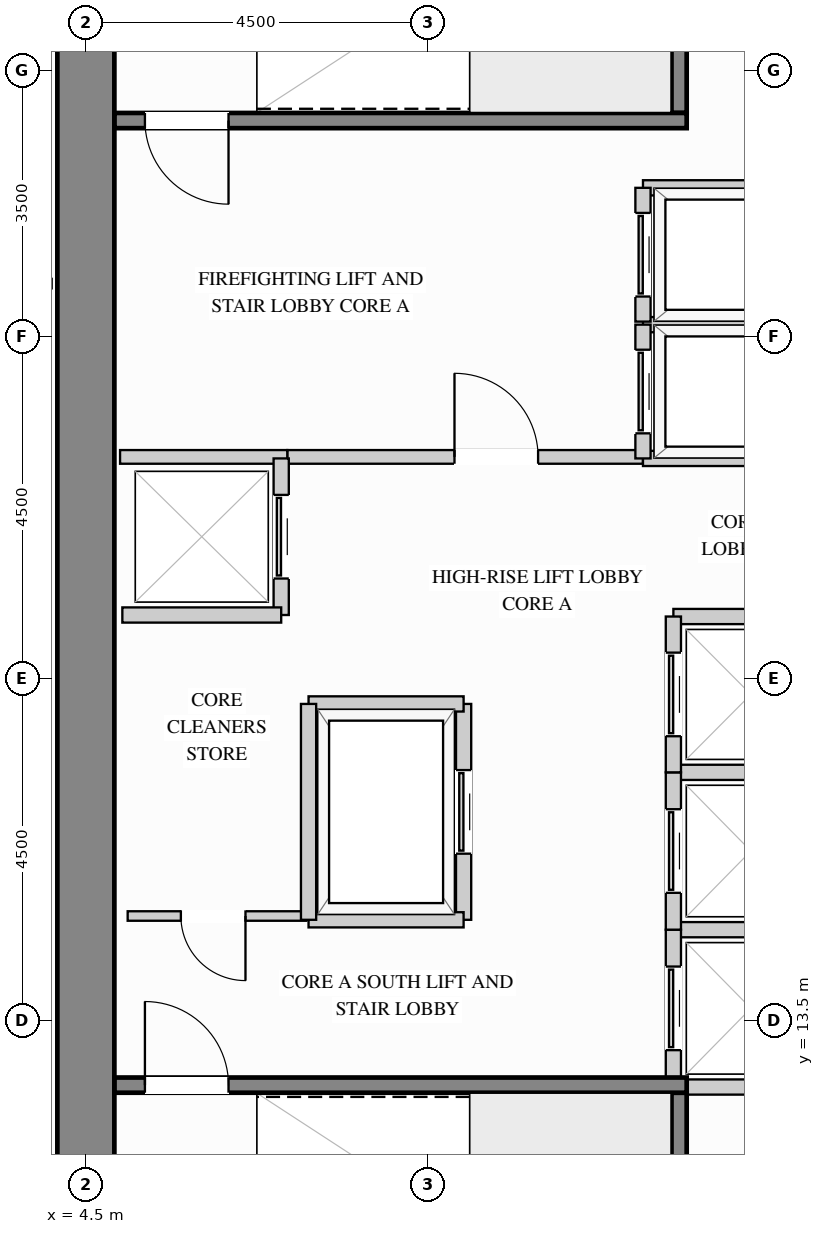
"""IFC4 building model, lengths in metres.
Left out: names, types, materials, properties, quantities, classifications, styles, units other than length and angle.
Written with IfcOpenShell. Run it as: python <this file> out.ifc"""

import sys

from ifc_helpers import new_model, si_unit, direction, frame, frame_2d, origin, place, context, subcontext, project, spatial, rectangle, extrude, source, transform, mapped, element, fill, save


model = new_model("IFC4")
c1 = context("Model", 3, precision=1e-05, world=origin(), true_north=direction((0.0, 1.0)))
c2 = subcontext(c1, "Body", "Model", "MODEL_VIEW")
j1 = project(units=[si_unit("LENGTHUNIT", "METRE"), si_unit("PLANEANGLEUNIT", "RADIAN")], contexts=[c1])
p1 = place(None, origin())
s1 = spatial("IfcSite", under=j1, at=p1, CompositionType="ELEMENT")
p2 = place(p1, origin())
s2 = spatial("IfcBuilding", under=s1, at=p2, CompositionType="ELEMENT")
p3 = place(p2, frame((0.0, 0.0, 135.0)))
s3 = spatial("IfcBuildingStorey", under=s2, at=p3, CompositionType="ELEMENT", Elevation=135.0)
m1 = source(origin(), c2, "Body", "SweptSolid", [
    extrude(rectangle(XDim=20.25, YDim=0.75, at=frame_2d((10.125, 0.0))), origin(), (0.0, 0.0, 1.0), 3.32),
])
p4 = place(p3, frame((4.5, 8.875, 0.0), z_axis=(0.0, 0.0, 1.0), x_axis=(0.0, 1.0, 0.0)))
e1 = element("IfcWall", 1, at=p4, inside=s3, PredefinedType="SHEAR", context=c2, shape_type="MappedRepresentation", body=[
    mapped(m1, transform((0.0, 0.0, 0.0), x_axis=(1.0, 0.0, 0.0), y_axis=(0.0, 1.0, 0.0), z_axis=(0.0, 0.0, 1.0))),
])
p5 = place(p3, frame((7.15, 20.92, 0.0), z_axis=(0.0, 0.0, 1.0), x_axis=(1.0, 0.0, 0.0)))
e2 = element("IfcWall", 2, at=p5, inside=s3, PredefinedType="PARTITIONING", context=c2, shape_type="SweptSolid", body=[
    extrude(rectangle(XDim=4.68, YDim=0.18, at=frame_2d((2.34, 0.0))), origin(), (0.0, 0.0, 1.0), 3.305),
])
p6 = place(p5, frame((2.2, 0.0, 0.0)))
e3 = element("IfcOpeningElement", 3, at=p6, cuts=e2, PredefinedType="OPENING", context=c2, shape_type="SweptSolid", body=[
    extrude(rectangle(XDim=1.1, YDim=2.15, at=frame_2d((0.55, 1.075))), frame((0.0, 0.1, 0.0), z_axis=(0.0, -1.0, 0.0), x_axis=(1.0, 0.0, 0.0)), (0.0, 0.0, 1.0), 0.2),
])
m2 = source(origin(), c2, "Body", "SweptSolid", [
    extrude(rectangle(XDim=2.2, YDim=0.18, at=frame_2d((1.1, 0.0))), origin(), (0.0, 0.0, 1.0), 3.305),
])
p7 = place(p3, frame((4.95, 20.92, 0.0), z_axis=(0.0, 0.0, 1.0), x_axis=(1.0, 0.0, 0.0)))
e4 = element("IfcWall", 4, at=p7, inside=s3, PredefinedType="PARTITIONING", context=c2, shape_type="MappedRepresentation", body=[
    mapped(m2, transform((0.0, 0.0, 0.0), x_axis=(1.0, 0.0, 0.0), y_axis=(0.0, 1.0, 0.0), z_axis=(0.0, 0.0, 1.0))),
])
p8 = place(p3, frame((5.05, 14.88, 0.0), z_axis=(0.0, 0.0, 1.0), x_axis=(1.0, 0.0, 0.0)))
e5 = element("IfcWall", 5, at=p8, inside=s3, PredefinedType="PARTITIONING", context=c2, shape_type="SweptSolid", body=[
    extrude(rectangle(XDim=2.35, YDim=0.125, at=frame_2d((1.175, 0.0))), origin(), (0.0, 0.0, 1.0), 3.305),
])
p9 = place(p8, frame((0.7, 0.0, 0.0)))
e6 = element("IfcOpeningElement", 6, at=p9, cuts=e5, PredefinedType="OPENING", context=c2, shape_type="SweptSolid", body=[
    extrude(rectangle(XDim=0.85, YDim=2.1, at=frame_2d((0.425, 1.05))), frame((0.0, 0.073, 0.0), z_axis=(0.0, -1.0, 0.0), x_axis=(1.0, 0.0, 0.0)), (0.0, 0.0, 1.0), 0.145),
])
m3 = source(origin(), c2, "Body", "SweptSolid", [
    extrude(rectangle(XDim=3.698, YDim=0.125, at=frame_2d((1.849, 0.0))), origin(), (0.0, 0.0, 1.0), 3.305),
])
p10 = place(p3, frame((0.352, 23.2, 0.0), z_axis=(0.0, 0.0, 1.0), x_axis=(1.0, 0.0, 0.0)))
e7 = element("IfcWall", 7, at=p10, inside=s3, PredefinedType="PARTITIONING", context=c2, shape_type="MappedRepresentation", body=[
    mapped(m3, transform((0.0, 0.0, 0.0), x_axis=(1.0, 0.0, 0.0), y_axis=(0.0, 1.0, 0.0), z_axis=(0.0, 0.0, 1.0))),
])
m4 = source(origin(), c2, "Body", "SweptSolid", [
    extrude(rectangle(XDim=2.265, YDim=0.2, at=frame_2d((1.132, 0.0))), origin(), (0.0, 0.0, 1.0), 3.305),
])
for number, where, z_axis, x_axis in (
    (8, (11.83, 22.66, 0.0), (0.0, 0.0, 1.0), (1.0, 0.0, 0.0)),
    (9, (11.83, 20.9, 0.0), (0.0, 0.0, 1.0), (1.0, 0.0, 0.0)),
):
    element("IfcWall", number, at=place(p3, frame(where, z_axis=z_axis, x_axis=x_axis)), inside=s3, PredefinedType="PARTITIONING", context=c2, shape_type="MappedRepresentation", body=[
        mapped(m4, transform((0.0, 0.0, 0.0), x_axis=(1.0, 0.0, 0.0), y_axis=(0.0, 1.0, 0.0), z_axis=(0.0, 0.0, 1.0))),
    ])
p11 = place(p3, frame((11.83, 20.9, 0.0), z_axis=(0.0, 0.0, 1.0), x_axis=(0.0, 1.0, 0.0)))
e10 = element("IfcWall", 10, at=p11, inside=s3, PredefinedType="PARTITIONING", context=c2, shape_type="SweptSolid", body=[
    extrude(rectangle(XDim=1.76, YDim=0.2, at=frame_2d((0.88, 0.0))), origin(), (0.0, 0.0, 1.0), 3.305),
])
p12 = place(p11, frame((0.33, 0.0, 0.0)))
e11 = element("IfcOpeningElement", 11, at=p12, cuts=e10, PredefinedType="OPENING", context=c2, shape_type="SweptSolid", body=[
    extrude(rectangle(XDim=1.1, YDim=2.2, at=frame_2d((0.55, 1.1))), frame((0.0, 0.11, 0.0), z_axis=(0.0, -1.0, 0.0), x_axis=(1.0, 0.0, 0.0)), (0.0, 0.0, 1.0), 0.22),
])
p13 = place(p3, frame((11.83, 24.46, 0.0), z_axis=(0.0, 0.0, 1.0), x_axis=(1.0, 0.0, 0.0)))
e12 = element("IfcWall", 12, at=p13, inside=s3, PredefinedType="PARTITIONING", context=c2, shape_type="MappedRepresentation", body=[
    mapped(m4, transform((0.0, 0.0, 0.0), x_axis=(1.0, 0.0, 0.0), y_axis=(0.0, 1.0, 0.0), z_axis=(0.0, 0.0, 1.0))),
])
p14 = place(p3, frame((11.83, 22.7, 0.0), z_axis=(0.0, 0.0, 1.0), x_axis=(0.0, 1.0, 0.0)))
e13 = element("IfcWall", 13, at=p14, inside=s3, PredefinedType="PARTITIONING", context=c2, shape_type="SweptSolid", body=[
    extrude(rectangle(XDim=1.76, YDim=0.2, at=frame_2d((0.88, 0.0))), origin(), (0.0, 0.0, 1.0), 3.305),
])
p15 = place(p14, frame((0.33, 0.0, 0.0)))
e14 = element("IfcOpeningElement", 14, at=p15, cuts=e13, PredefinedType="OPENING", context=c2, shape_type="SweptSolid", body=[
    extrude(rectangle(XDim=1.1, YDim=2.2, at=frame_2d((0.55, 1.1))), frame((0.0, 0.11, 0.0), z_axis=(0.0, -1.0, 0.0), x_axis=(1.0, 0.0, 0.0)), (0.0, 0.0, 1.0), 0.22),
])
m5 = source(origin(), c2, "Body", "SweptSolid", [
    extrude(rectangle(XDim=1.865, YDim=0.2, at=frame_2d((0.933, 0.0))), origin(), (0.0, 0.0, 1.0), 3.305),
])
for number, where, z_axis, x_axis in (
    (15, (12.23, 14.7, 0.0), (0.0, 0.0, 1.0), (1.0, 0.0, 0.0)),
    (16, (12.23, 12.63, 0.0), (0.0, 0.0, 1.0), (1.0, 0.0, 0.0)),
):
    element("IfcWall", number, at=place(p3, frame(where, z_axis=z_axis, x_axis=x_axis)), inside=s3, PredefinedType="PARTITIONING", context=c2, shape_type="MappedRepresentation", body=[
        mapped(m5, transform((0.0, 0.0, 0.0), x_axis=(1.0, 0.0, 0.0), y_axis=(0.0, 1.0, 0.0), z_axis=(0.0, 0.0, 1.0))),
    ])
p16 = place(p3, frame((12.23, 12.63, 0.0), z_axis=(0.0, 0.0, 1.0), x_axis=(0.0, 1.0, 0.0)))
e17 = element("IfcWall", 17, at=p16, inside=s3, PredefinedType="PARTITIONING", context=c2, shape_type="SweptSolid", body=[
    extrude(rectangle(XDim=2.07, YDim=0.2, at=frame_2d((1.035, 0.0))), origin(), (0.0, 0.0, 1.0), 3.305),
])
p17 = place(p16, frame((0.485, 0.0, 0.0)))
e18 = element("IfcOpeningElement", 18, at=p17, cuts=e17, PredefinedType="OPENING", context=c2, shape_type="SweptSolid", body=[
    extrude(rectangle(XDim=1.1, YDim=2.2, at=frame_2d((0.55, 1.1))), frame((0.0, 0.11, 0.0), z_axis=(0.0, -1.0, 0.0), x_axis=(1.0, 0.0, 0.0)), (0.0, 0.0, 1.0), 0.22),
])
p18 = place(p3, frame((12.23, 16.77, 0.0), z_axis=(0.0, 0.0, 1.0), x_axis=(1.0, 0.0, 0.0)))
e19 = element("IfcWall", 19, at=p18, inside=s3, PredefinedType="PARTITIONING", context=c2, shape_type="MappedRepresentation", body=[
    mapped(m5, transform((0.0, 0.0, 0.0), x_axis=(1.0, 0.0, 0.0), y_axis=(0.0, 1.0, 0.0), z_axis=(0.0, 0.0, 1.0))),
])
p19 = place(p3, frame((12.23, 14.7, 0.0), z_axis=(0.0, 0.0, 1.0), x_axis=(0.0, 1.0, 0.0)))
e20 = element("IfcWall", 20, at=p19, inside=s3, PredefinedType="PARTITIONING", context=c2, shape_type="SweptSolid", body=[
    extrude(rectangle(XDim=2.07, YDim=0.2, at=frame_2d((1.035, 0.0))), origin(), (0.0, 0.0, 1.0), 3.305),
])
p20 = place(p19, frame((0.485, 0.0, 0.0)))
e21 = element("IfcOpeningElement", 21, at=p20, cuts=e20, PredefinedType="OPENING", context=c2, shape_type="SweptSolid", body=[
    extrude(rectangle(XDim=1.1, YDim=2.2, at=frame_2d((0.55, 1.1))), frame((0.0, 0.11, 0.0), z_axis=(0.0, -1.0, 0.0), x_axis=(1.0, 0.0, 0.0)), (0.0, 0.0, 1.0), 0.22),
])
p21 = place(p3, frame((12.23, 18.82, 0.0), z_axis=(0.0, 0.0, 1.0), x_axis=(1.0, 0.0, 0.0)))
e22 = element("IfcWall", 22, at=p21, inside=s3, PredefinedType="PARTITIONING", context=c2, shape_type="MappedRepresentation", body=[
    mapped(m5, transform((0.0, 0.0, 0.0), x_axis=(1.0, 0.0, 0.0), y_axis=(0.0, 1.0, 0.0), z_axis=(0.0, 0.0, 1.0))),
])
p22 = place(p3, frame((12.23, 16.77, 0.0), z_axis=(0.0, 0.0, 1.0), x_axis=(0.0, 1.0, 0.0)))
e23 = element("IfcWall", 23, at=p22, inside=s3, PredefinedType="PARTITIONING", context=c2, shape_type="SweptSolid", body=[
    extrude(rectangle(XDim=2.05, YDim=0.2, at=frame_2d((1.025, 0.0))), origin(), (0.0, 0.0, 1.0), 3.305),
])
p23 = place(p22, frame((0.475, 0.0, 0.0)))
e24 = element("IfcOpeningElement", 24, at=p23, cuts=e23, PredefinedType="OPENING", context=c2, shape_type="SweptSolid", body=[
    extrude(rectangle(XDim=1.1, YDim=2.2, at=frame_2d((0.55, 1.1))), frame((0.0, 0.11, 0.0), z_axis=(0.0, -1.0, 0.0), x_axis=(1.0, 0.0, 0.0)), (0.0, 0.0, 1.0), 0.22),
])
p24 = place(p3, frame((7.07, 18.84, 0.0), z_axis=(0.0, 0.0, 1.0), x_axis=(0.0, 1.0, 0.0)))
e25 = element("IfcWall", 25, at=p24, inside=s3, PredefinedType="PARTITIONING", context=c2, shape_type="SweptSolid", body=[
    extrude(rectangle(XDim=2.06, YDim=0.2, at=frame_2d((1.03, 0.0))), origin(), (0.0, 0.0, 1.0), 3.305),
])
p25 = place(p24, frame((0.48, 0.0, 0.0)))
e26 = element("IfcOpeningElement", 26, at=p25, cuts=e25, PredefinedType="OPENING", context=c2, shape_type="SweptSolid", body=[
    extrude(rectangle(XDim=1.1, YDim=2.2, at=frame_2d((0.55, 1.1))), frame((0.0, 0.11, 0.0), z_axis=(0.0, -1.0, 0.0), x_axis=(1.0, 0.0, 0.0)), (0.0, 0.0, 1.0), 0.22),
])
m6 = source(origin(), c2, "Body", "SweptSolid", [
    extrude(rectangle(XDim=2.09, YDim=0.2, at=frame_2d((1.045, 0.0))), origin(), (0.0, 0.0, 1.0), 3.305),
])
p26 = place(p3, frame((4.98, 18.84, 0.0), z_axis=(0.0, 0.0, 1.0), x_axis=(1.0, 0.0, 0.0)))
e27 = element("IfcWall", 27, at=p26, inside=s3, PredefinedType="PARTITIONING", context=c2, shape_type="MappedRepresentation", body=[
    mapped(m6, transform((0.0, 0.0, 0.0), x_axis=(1.0, 0.0, 0.0), y_axis=(0.0, 1.0, 0.0), z_axis=(0.0, 0.0, 1.0))),
])
p27 = place(p3, frame((9.47, 14.83, 0.0), z_axis=(0.0, 0.0, 1.0), x_axis=(0.0, 1.0, 0.0)))
e28 = element("IfcWall", 28, at=p27, inside=s3, PredefinedType="PARTITIONING", context=c2, shape_type="SweptSolid", body=[
    extrude(rectangle(XDim=2.84, YDim=0.2, at=frame_2d((1.42, 0.0))), origin(), (0.0, 0.0, 1.0), 3.305),
])
p28 = place(p27, frame((0.87, 0.0, 0.0)))
e29 = element("IfcOpeningElement", 29, at=p28, cuts=e28, PredefinedType="OPENING", context=c2, shape_type="SweptSolid", body=[
    extrude(rectangle(XDim=1.1, YDim=2.2, at=frame_2d((0.55, 1.1))), frame((0.0, 0.11, 0.0), z_axis=(0.0, -1.0, 0.0), x_axis=(1.0, 0.0, 0.0)), (0.0, 0.0, 1.0), 0.22),
])
m7 = source(origin(), c2, "Body", "SweptSolid", [
    extrude(rectangle(XDim=2.04, YDim=0.2, at=frame_2d((1.02, 0.0))), origin(), (0.0, 0.0, 1.0), 3.305),
])
for number, where, z_axis, x_axis in (
    (30, (7.43, 17.67, 0.0), (0.0, 0.0, 1.0), (1.0, 0.0, 0.0)),
    (31, (7.43, 14.83, 0.0), (0.0, 0.0, 1.0), (1.0, 0.0, 0.0)),
):
    element("IfcWall", number, at=place(p3, frame(where, z_axis=z_axis, x_axis=x_axis)), inside=s3, PredefinedType="PARTITIONING", context=c2, shape_type="MappedRepresentation", body=[
        mapped(m7, transform((0.0, 0.0, 0.0), x_axis=(1.0, 0.0, 0.0), y_axis=(0.0, 1.0, 0.0), z_axis=(0.0, 0.0, 1.0))),
    ])
m8 = source(origin(), c2, "Body", "SweptSolid", [
    extrude(rectangle(XDim=2.84, YDim=0.2, at=frame_2d((1.42, 0.0))), origin(), (0.0, 0.0, 1.0), 3.305),
])
p29 = place(p3, frame((7.43, 14.83, 0.0), z_axis=(0.0, 0.0, 1.0), x_axis=(0.0, 1.0, 0.0)))
e32 = element("IfcWall", 32, at=p29, inside=s3, PredefinedType="PARTITIONING", context=c2, shape_type="MappedRepresentation", body=[
    mapped(m8, transform((0.0, 0.0, 0.0), x_axis=(1.0, 0.0, 0.0), y_axis=(0.0, 1.0, 0.0), z_axis=(0.0, 0.0, 1.0))),
])
m9 = source(origin(), c2, "Body", "SweptSolid", [
    extrude(rectangle(XDim=3.678, YDim=0.2, at=frame_2d((1.839, 0.0))), origin(), (0.0, 0.0, 1.0), 3.32),
])
p30 = place(p3, frame((12.305, 8.877, 0.0), z_axis=(0.0, 0.0, 1.0), x_axis=(0.0, 1.0, 0.0)))
e33 = element("IfcWall", 33, at=p30, inside=s3, PredefinedType="SHEAR", context=c2, shape_type="MappedRepresentation", body=[
    mapped(m9, transform((0.0, 0.0, 0.0), x_axis=(1.0, 0.0, 0.0), y_axis=(0.0, 1.0, 0.0), z_axis=(0.0, 0.0, 1.0))),
])
p31 = place(p3, frame((4.877, 12.655, 0.0), z_axis=(0.0, 0.0, 1.0), x_axis=(1.0, 0.0, 0.0)))
e34 = element("IfcWall", 34, at=p31, inside=s3, PredefinedType="SHEAR", context=c2, shape_type="SweptSolid", body=[
    extrude(rectangle(XDim=7.528, YDim=0.2, at=frame_2d((3.764, 0.0))), origin(), (0.0, 0.0, 1.0), 3.32),
])
p32 = place(p31, frame((0.4, 0.0, 0.0)))
e35 = element("IfcOpeningElement", 35, at=p32, cuts=e34, PredefinedType="OPENING", context=c2, shape_type="SweptSolid", body=[
    extrude(rectangle(XDim=1.1, YDim=2.15, at=frame_2d((0.55, 1.075))), frame((0.0, 0.11, 0.0), z_axis=(0.0, -1.0, 0.0), x_axis=(1.0, 0.0, 0.0)), (0.0, 0.0, 1.0), 0.22),
])
p33 = place(p3, frame((12.305, 25.445, 0.0), z_axis=(0.0, 0.0, 1.0), x_axis=(0.0, 1.0, 0.0)))
e36 = element("IfcWall", 36, at=p33, inside=s3, PredefinedType="SHEAR", context=c2, shape_type="MappedRepresentation", body=[
    mapped(m9, transform((0.0, 0.0, 0.0), x_axis=(1.0, 0.0, 0.0), y_axis=(0.0, 1.0, 0.0), z_axis=(0.0, 0.0, 1.0))),
])
p34 = place(p3, frame((4.877, 25.345, 0.0), z_axis=(0.0, 0.0, 1.0), x_axis=(1.0, 0.0, 0.0)))
e37 = element("IfcWall", 37, at=p34, inside=s3, PredefinedType="SHEAR", context=c2, shape_type="SweptSolid", body=[
    extrude(rectangle(XDim=7.528, YDim=0.2, at=frame_2d((3.764, 0.0))), origin(), (0.0, 0.0, 1.0), 3.32),
])
p35 = place(p34, frame((0.4, 0.0, 0.0)))
e38 = element("IfcOpeningElement", 38, at=p35, cuts=e37, PredefinedType="OPENING", context=c2, shape_type="SweptSolid", body=[
    extrude(rectangle(XDim=1.1, YDim=2.15, at=frame_2d((0.55, 1.075))), frame((0.0, 0.11, 0.0), z_axis=(0.0, -1.0, 0.0), x_axis=(1.0, 0.0, 0.0)), (0.0, 0.0, 1.0), 0.22),
])
m10 = source(origin(), c2, "Body", "SweptSolid", [
    extrude(rectangle(XDim=1.1, YDim=2.15, at=frame_2d((0.55, 1.075))), frame((0.0, 0.025, 0.0), z_axis=(0.0, -1.0, 0.0), x_axis=(1.0, 0.0, 0.0)), (0.0, 0.0, 1.0), 0.05),
])
p36 = place(p6, origin())
e39 = element("IfcDoor", 39, at=p36, inside=s3, OperationType="SINGLE_SWING_LEFT", PredefinedType="DOOR", context=c2, shape_type="MappedRepresentation", body=[
    mapped(m10, transform((0.0, 0.0, 0.0), x_axis=(1.0, 0.0, 0.0), y_axis=(0.0, 1.0, 0.0), z_axis=(0.0, 0.0, 1.0))),
])
fill(e3, e39)
m11 = source(origin(), c2, "Body", "SweptSolid", [
    extrude(rectangle(XDim=1.1, YDim=2.2, at=frame_2d((0.55, 1.1))), frame((0.0, 0.025, 0.0), z_axis=(0.0, -1.0, 0.0), x_axis=(1.0, 0.0, 0.0)), (0.0, 0.0, 1.0), 0.05),
])
p37 = place(p12, origin())
e40 = element("IfcDoor", 40, at=p37, inside=s3, OperationType="SLIDING_TO_LEFT", PredefinedType="DOOR", context=c2, shape_type="MappedRepresentation", body=[
    mapped(m11, transform((0.0, 0.0, 0.0), x_axis=(1.0, 0.0, 0.0), y_axis=(0.0, 1.0, 0.0), z_axis=(0.0, 0.0, 1.0))),
])
fill(e11, e40)
p38 = place(p15, origin())
e41 = element("IfcDoor", 41, at=p38, inside=s3, OperationType="SLIDING_TO_LEFT", PredefinedType="DOOR", context=c2, shape_type="MappedRepresentation", body=[
    mapped(m11, transform((0.0, 0.0, 0.0), x_axis=(1.0, 0.0, 0.0), y_axis=(0.0, 1.0, 0.0), z_axis=(0.0, 0.0, 1.0))),
])
fill(e14, e41)
p39 = place(p17, origin())
e42 = element("IfcDoor", 42, at=p39, inside=s3, OperationType="SLIDING_TO_LEFT", PredefinedType="DOOR", context=c2, shape_type="MappedRepresentation", body=[
    mapped(m11, transform((0.0, 0.0, 0.0), x_axis=(1.0, 0.0, 0.0), y_axis=(0.0, 1.0, 0.0), z_axis=(0.0, 0.0, 1.0))),
])
fill(e18, e42)
p40 = place(p20, origin())
e43 = element("IfcDoor", 43, at=p40, inside=s3, OperationType="SLIDING_TO_LEFT", PredefinedType="DOOR", context=c2, shape_type="MappedRepresentation", body=[
    mapped(m11, transform((0.0, 0.0, 0.0), x_axis=(1.0, 0.0, 0.0), y_axis=(0.0, 1.0, 0.0), z_axis=(0.0, 0.0, 1.0))),
])
fill(e21, e43)
p41 = place(p23, origin())
e44 = element("IfcDoor", 44, at=p41, inside=s3, OperationType="SLIDING_TO_LEFT", PredefinedType="DOOR", context=c2, shape_type="MappedRepresentation", body=[
    mapped(m11, transform((0.0, 0.0, 0.0), x_axis=(1.0, 0.0, 0.0), y_axis=(0.0, 1.0, 0.0), z_axis=(0.0, 0.0, 1.0))),
])
fill(e24, e44)
p42 = place(p25, origin())
e45 = element("IfcDoor", 45, at=p42, inside=s3, OperationType="SLIDING_TO_LEFT", PredefinedType="DOOR", context=c2, shape_type="MappedRepresentation", body=[
    mapped(m11, transform((0.0, 0.0, 0.0), x_axis=(1.0, 0.0, 0.0), y_axis=(0.0, 1.0, 0.0), z_axis=(0.0, 0.0, 1.0))),
])
fill(e26, e45)
p43 = place(p28, origin())
e46 = element("IfcDoor", 46, at=p43, inside=s3, OperationType="SLIDING_TO_LEFT", PredefinedType="DOOR", context=c2, shape_type="MappedRepresentation", body=[
    mapped(m11, transform((0.0, 0.0, 0.0), x_axis=(1.0, 0.0, 0.0), y_axis=(0.0, 1.0, 0.0), z_axis=(0.0, 0.0, 1.0))),
])
fill(e29, e46)
m12 = source(origin(), c2, "Body", "SweptSolid", [
    extrude(rectangle(XDim=0.85, YDim=2.1, at=frame_2d((0.425, 1.05))), frame((0.0, 0.025, 0.0), z_axis=(0.0, -1.0, 0.0), x_axis=(1.0, 0.0, 0.0)), (0.0, 0.0, 1.0), 0.05),
])
p44 = place(p9, origin())
e47 = element("IfcDoor", 47, at=p44, inside=s3, OperationType="SINGLE_SWING_RIGHT", PredefinedType="DOOR", context=c2, shape_type="MappedRepresentation", body=[
    mapped(m12, transform((0.0, 0.0, 0.0), x_axis=(1.0, 0.0, 0.0), y_axis=(0.0, 1.0, 0.0), z_axis=(0.0, 0.0, 1.0))),
])
fill(e6, e47)
m13 = source(origin(), c2, "Body", "SweptSolid", [
    extrude(rectangle(XDim=1.1, YDim=2.15, at=frame_2d((0.55, 1.075))), frame((0.0, 0.025, 0.0), z_axis=(0.0, -1.0, 0.0), x_axis=(1.0, 0.0, 0.0)), (0.0, 0.0, 1.0), 0.05),
])
p45 = place(p32, origin())
e48 = element("IfcDoor", 48, at=p45, inside=s3, OperationType="SINGLE_SWING_LEFT", PredefinedType="DOOR", context=c2, shape_type="MappedRepresentation", body=[
    mapped(m13, transform((0.0, 0.0, 0.0), x_axis=(1.0, 0.0, 0.0), y_axis=(0.0, 1.0, 0.0), z_axis=(0.0, 0.0, 1.0))),
])
fill(e35, e48)
p46 = place(p35, origin())
e49 = element("IfcDoor", 49, at=p46, inside=s3, OperationType="SINGLE_SWING_RIGHT", PredefinedType="DOOR", context=c2, shape_type="MappedRepresentation", body=[
    mapped(m13, transform((0.0, 0.0, 0.0), x_axis=(1.0, 0.0, 0.0), y_axis=(0.0, 1.0, 0.0), z_axis=(0.0, 0.0, 1.0))),
])
fill(e38, e49)
save(model, sys.argv[1])
